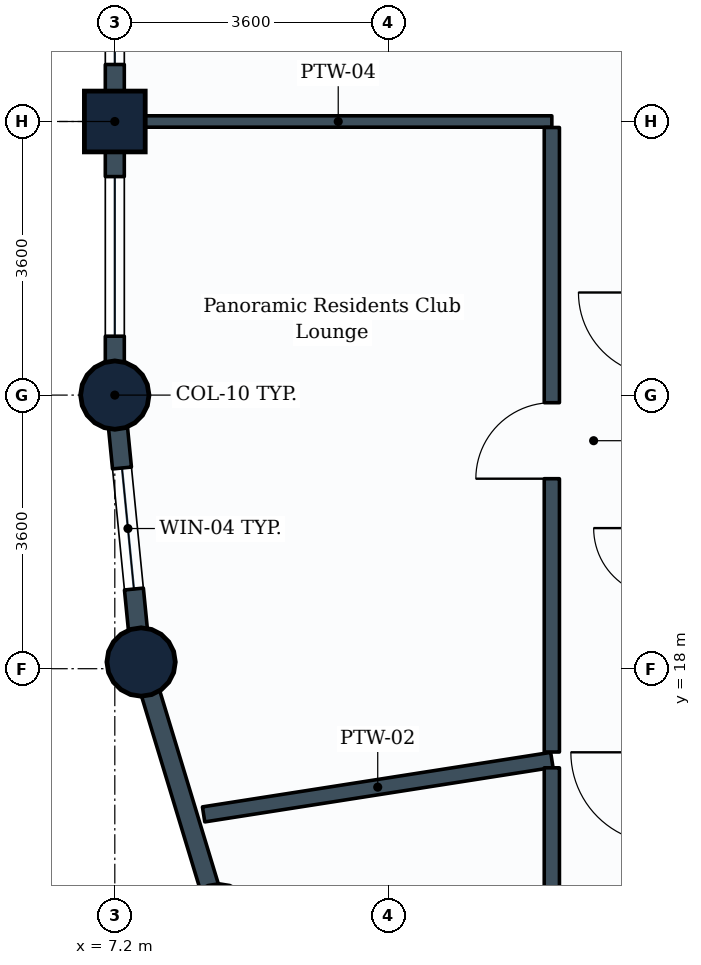
"""IFC4 building model, lengths in metres.
Left out: names, types, materials, properties, quantities, classifications, styles, units other than length and angle.
Written with IfcOpenShell. Run it as: python <this file> out.ifc"""

import sys

from ifc_helpers import new_model, si_unit, direction, frame, frame_2d, origin, origin_2d, place, context, subcontext, project, spatial, rectangle, circle, extrude, element, fill, save


model = new_model("IFC4")
c1 = context("Model", 3, precision=1e-05, world=origin(), true_north=direction((0.0, 1.0)))
c2 = subcontext(c1, "Body", "Model", "MODEL_VIEW")
j1 = project(units=[si_unit("LENGTHUNIT", "METRE"), si_unit("PLANEANGLEUNIT", "RADIAN")], contexts=[c1])
p1 = place(None, origin())
s1 = spatial("IfcSite", under=j1, at=p1, CompositionType="ELEMENT")
p2 = place(p1, origin())
s2 = spatial("IfcBuilding", under=s1, at=p2, CompositionType="ELEMENT")
p3 = place(p2, frame((0.0, 0.0, 224.6)))
s3 = spatial("IfcBuildingStorey", under=s2, at=p3, CompositionType="ELEMENT", Elevation=224.6)
p4 = place(p3, frame((7.2, 21.6, 0.0), z_axis=(0.0, 0.0, 1.0), x_axis=(1.0, 0.0, 0.0)))
e1 = element("IfcColumn", 1, at=p4, inside=s3, PredefinedType="COLUMN", context=c2, shape_type="SweptSolid", body=[
    extrude(circle(Radius=0.45, at=origin_2d()), origin(), (0.0, 0.0, 1.0), 3.6),
])
p5 = place(p3, frame((7.2, 25.2, 0.0), z_axis=(0.0, 0.0, 1.0), x_axis=(0.0, 1.0, 0.0)))
e2 = element("IfcColumn", 2, at=p5, inside=s3, PredefinedType="COLUMN", context=c2, shape_type="SweptSolid", body=[
    extrude(rectangle(XDim=0.8, YDim=0.8, at=origin_2d()), origin(), (0.0, 0.0, 1.0), 3.6),
])
for number, where, z_axis, x_axis in (
    (3, (7.546, 18.088, 0.0), (0.0, 0.0, 1.0), (1.0, 0.0, 0.0)),
    (4, (8.57, 14.712, 0.0), (0.0, 0.0, 1.0), (1.0, 0.0, 0.0)),
):
    element("IfcColumn", number, at=place(p3, frame(where, z_axis=z_axis, x_axis=x_axis)), inside=s3, PredefinedType="COLUMN", context=c2, shape_type="SweptSolid", body=[
        extrude(circle(Radius=0.45, at=origin_2d()), origin(), (0.0, 0.0, 1.0), 3.6),
    ])
p6 = place(p3, frame((7.2, 25.2, 0.0), z_axis=(0.0, 0.0, 1.0), x_axis=(0.0, 1.0, 0.0)))
e5 = element("IfcWall", 5, at=p6, inside=s3, PredefinedType="STANDARD", context=c2, shape_type="SweptSolid", body=[
    extrude(rectangle(XDim=3.6, YDim=0.25, at=frame_2d((1.8, 0.0))), origin(), (0.0, 0.0, 1.0), 2.83),
])
p7 = place(p6, frame((0.75, 0.0, 0.85)))
e6 = element("IfcOpeningElement", 6, at=p7, cuts=e5, PredefinedType="OPENING", context=c2, shape_type="SweptSolid", body=[
    extrude(rectangle(XDim=2.1, YDim=1.35, at=frame_2d((1.05, 0.675))), frame((0.0, 0.135, 0.0), z_axis=(0.0, -1.0, 0.0), x_axis=(1.0, 0.0, 0.0)), (0.0, 0.0, 1.0), 0.27),
])
p8 = place(p3, frame((7.2, 21.6, 0.0), z_axis=(0.0, 0.0, 1.0), x_axis=(0.0, 1.0, 0.0)))
e7 = element("IfcWall", 7, at=p8, inside=s3, PredefinedType="STANDARD", context=c2, shape_type="SweptSolid", body=[
    extrude(rectangle(XDim=3.6, YDim=0.25, at=frame_2d((1.8, 0.0))), origin(), (0.0, 0.0, 1.0), 2.83),
])
p9 = place(p8, frame((0.775, 0.0, 0.85)))
e8 = element("IfcOpeningElement", 8, at=p9, cuts=e7, PredefinedType="OPENING", context=c2, shape_type="SweptSolid", body=[
    extrude(rectangle(XDim=2.1, YDim=1.35, at=frame_2d((1.05, 0.675))), frame((0.0, 0.135, 0.0), z_axis=(0.0, -1.0, 0.0), x_axis=(1.0, 0.0, 0.0)), (0.0, 0.0, 1.0), 0.27),
])
p10 = place(p3, frame((7.546, 18.088, 0.0), z_axis=(0.0, 0.0, 1.0), x_axis=(-0.09802417461, 0.995184033831, 0.0)))
e9 = element("IfcWall", 9, at=p10, inside=s3, PredefinedType="STANDARD", context=c2, shape_type="SweptSolid", body=[
    extrude(rectangle(XDim=3.529, YDim=0.25, at=frame_2d((1.765, 0.0))), origin(), (0.0, 0.0, 1.0), 2.83),
])
p11 = place(p10, frame((0.965, 0.0, 0.85)))
e10 = element("IfcOpeningElement", 10, at=p11, cuts=e9, PredefinedType="OPENING", context=c2, shape_type="SweptSolid", body=[
    extrude(rectangle(XDim=1.6, YDim=1.35, at=frame_2d((0.8, 0.675))), frame((0.0, 0.135, 0.0), z_axis=(0.0, -1.0, 0.0), x_axis=(1.0, 0.0, 0.0)), (0.0, 0.0, 1.0), 0.27),
])
p12 = place(p3, frame((8.57, 14.712, 0.0), z_axis=(0.0, 0.0, 1.0), x_axis=(-0.290305086481, 0.956934144423, 0.0)))
e11 = element("IfcWall", 11, at=p12, inside=s3, PredefinedType="STANDARD", context=c2, shape_type="SweptSolid", body=[
    extrude(rectangle(XDim=3.528, YDim=0.25, at=frame_2d((1.764, 0.0))), origin(), (0.0, 0.0, 1.0), 2.83),
])
p13 = place(p3, frame((7.329, 25.2, 0.0), z_axis=(0.0, 0.0, 1.0), x_axis=(1.0, 0.0, 0.0)))
e12 = element("IfcWall", 12, at=p13, inside=s3, PredefinedType="PARTITIONING", context=c2, shape_type="SweptSolid", body=[
    extrude(rectangle(XDim=5.621, YDim=0.15, at=frame_2d((2.811, 0.0))), origin(), (0.0, 0.0, 1.0), 3.335),
])
p14 = place(p3, frame((12.95, 16.8, 0.0), z_axis=(0.0, 0.0, 1.0), x_axis=(-0.9879733582, -0.154624200844, 0.0)))
e13 = element("IfcWall", 13, at=p14, inside=s3, PredefinedType="PARTITIONING", context=c2, shape_type="SweptSolid", body=[
    extrude(rectangle(XDim=4.637, YDim=0.2, at=frame_2d((2.319, 0.0))), origin(), (0.0, 0.0, 1.0), 2.83),
])
p15 = place(p3, frame((12.95, 16.904, 0.0), z_axis=(0.0, 0.0, 1.0), x_axis=(0.0, 1.0, 0.0)))
e14 = element("IfcWall", 14, at=p15, inside=s3, PredefinedType="PARTITIONING", context=c2, shape_type="SweptSolid", body=[
    extrude(rectangle(XDim=8.217, YDim=0.2, at=frame_2d((4.108, 0.0))), origin(), (0.0, 0.0, 1.0), 3.02),
])
p16 = place(p15, frame((3.596, 0.0, 0.0)))
e15 = element("IfcOpeningElement", 15, at=p16, cuts=e14, PredefinedType="OPENING", context=c2, shape_type="SweptSolid", body=[
    extrude(rectangle(XDim=1.0, YDim=2.1, at=frame_2d((0.5, 1.05))), frame((0.0, 0.11, 0.0), z_axis=(0.0, -1.0, 0.0), x_axis=(1.0, 0.0, 0.0)), (0.0, 0.0, 1.0), 0.22),
])
p17 = place(p3, frame((12.95, 9.35, 0.0), z_axis=(0.0, 0.0, 1.0), x_axis=(0.0, 1.0, 0.0)))
e16 = element("IfcWall", 16, at=p17, inside=s3, PredefinedType="PARTITIONING", context=c2, shape_type="SweptSolid", body=[
    extrude(rectangle(XDim=7.346, YDim=0.2, at=frame_2d((3.673, 0.0))), origin(), (0.0, 0.0, 1.0), 3.02),
])
p18 = place(p17, frame((4.261, 0.0, 0.0)))
e17 = element("IfcOpeningElement", 17, at=p18, cuts=e16, PredefinedType="OPENING", context=c2, shape_type="SweptSolid", body=[
    extrude(rectangle(XDim=1.0, YDim=2.1, at=frame_2d((0.5, 1.05))), frame((0.0, 0.11, 0.0), z_axis=(0.0, -1.0, 0.0), x_axis=(1.0, 0.0, 0.0)), (0.0, 0.0, 1.0), 0.22),
])
p19 = place(p7, origin())
e18 = element("IfcWindow", 18, at=p19, inside=s3, PartitioningType="SINGLE_PANEL", PredefinedType="WINDOW", context=c2, shape_type="SweptSolid", body=[
    extrude(rectangle(XDim=2.1, YDim=1.35, at=frame_2d((1.05, 0.675))), frame((0.0, 0.03, 0.0), z_axis=(0.0, -1.0, 0.0), x_axis=(1.0, 0.0, 0.0)), (0.0, 0.0, 1.0), 0.06),
])
fill(e6, e18)
p20 = place(p9, origin())
e19 = element("IfcWindow", 19, at=p20, inside=s3, PartitioningType="SINGLE_PANEL", PredefinedType="WINDOW", context=c2, shape_type="SweptSolid", body=[
    extrude(rectangle(XDim=2.1, YDim=1.35, at=frame_2d((1.05, 0.675))), frame((0.0, 0.03, 0.0), z_axis=(0.0, -1.0, 0.0), x_axis=(1.0, 0.0, 0.0)), (0.0, 0.0, 1.0), 0.06),
])
fill(e8, e19)
p21 = place(p11, origin())
e20 = element("IfcWindow", 20, at=p21, inside=s3, PartitioningType="SINGLE_PANEL", PredefinedType="WINDOW", context=c2, shape_type="SweptSolid", body=[
    extrude(rectangle(XDim=1.6, YDim=1.35, at=frame_2d((0.8, 0.675))), frame((0.0, 0.03, 0.0), z_axis=(0.0, -1.0, 0.0), x_axis=(1.0, 0.0, 0.0)), (0.0, 0.0, 1.0), 0.06),
])
fill(e10, e20)
p22 = place(p16, origin())
e21 = element("IfcDoor", 21, at=p22, inside=s3, OperationType="SINGLE_SWING_LEFT", PredefinedType="DOOR", context=c2, shape_type="SweptSolid", body=[
    extrude(rectangle(XDim=1.0, YDim=2.1, at=frame_2d((0.5, 1.05))), frame((0.0, 0.025, 0.0), z_axis=(0.0, -1.0, 0.0), x_axis=(1.0, 0.0, 0.0)), (0.0, 0.0, 1.0), 0.05),
])
fill(e15, e21)
save(model, sys.argv[1])
